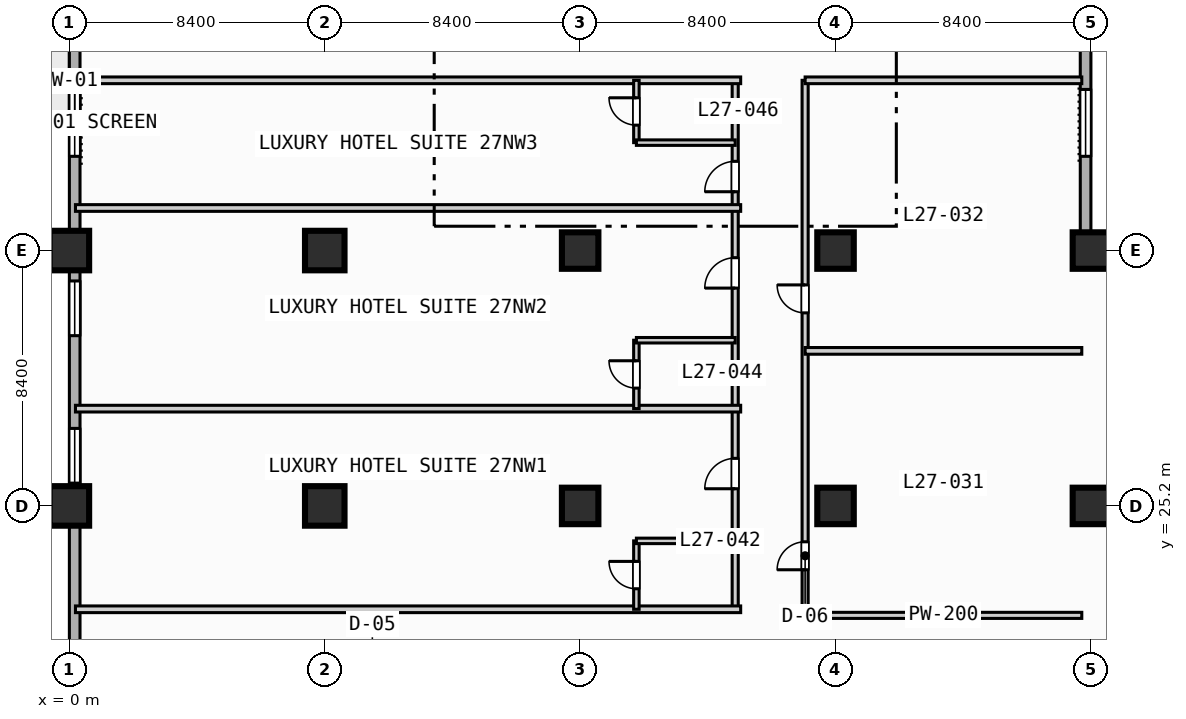
"""IFC4 building model, lengths in metres.
Left out: names, types, materials, properties, quantities, classifications, styles, units other than length and angle.
Written with IfcOpenShell. Run it as: python <this file> out.ifc"""

import sys

from ifc_helpers import new_model, si_unit, direction, frame, frame_2d, origin, origin_2d, place, context, subcontext, project, spatial, rectangle, extrude, element, fill, save


model = new_model("IFC4")
c1 = context("Model", 3, precision=1e-05, world=origin(), true_north=direction((0.0, 1.0)))
c2 = subcontext(c1, "Body", "Model", "MODEL_VIEW")
j1 = project(units=[si_unit("LENGTHUNIT", "METRE"), si_unit("PLANEANGLEUNIT", "RADIAN")], contexts=[c1])
p1 = place(None, origin())
s1 = spatial("IfcSite", under=j1, at=p1, CompositionType="ELEMENT")
p2 = place(p1, origin())
s2 = spatial("IfcBuilding", under=s1, at=p2, CompositionType="ELEMENT")
p3 = place(p2, frame((0.0, 0.0, 115.2)))
s3 = spatial("IfcBuildingStorey", under=s2, at=p3, CompositionType="ELEMENT", Elevation=115.2)
for number, where, z_axis, x_axis in (
    (1, (0.0, 25.2, 0.0), (0.0, 0.0, 1.0), (1.0, 0.0, 0.0)),
    (2, (0.0, 33.6, 0.0), (0.0, 0.0, 1.0), (1.0, 0.0, 0.0)),
    (3, (8.4, 25.2, 0.0), (0.0, 0.0, 1.0), (1.0, 0.0, 0.0)),
    (4, (8.4, 33.6, 0.0), (0.0, 0.0, 1.0), (1.0, 0.0, 0.0)),
):
    element("IfcColumn", number, at=place(p3, frame(where, z_axis=z_axis, x_axis=x_axis)), inside=s3, PredefinedType="COLUMN", context=c2, shape_type="SweptSolid", body=[
        extrude(rectangle(XDim=1.3, YDim=1.3, at=origin_2d()), origin(), (0.0, 0.0, 1.0), 3.8),
    ])
for number, where, z_axis, x_axis in (
    (5, (16.8, 25.2, 0.0), (0.0, 0.0, 1.0), (1.0, 0.0, 0.0)),
    (6, (16.8, 33.6, 0.0), (0.0, 0.0, 1.0), (1.0, 0.0, 0.0)),
    (7, (25.2, 25.2, 0.0), (0.0, 0.0, 1.0), (1.0, 0.0, 0.0)),
    (8, (25.2, 33.6, 0.0), (0.0, 0.0, 1.0), (1.0, 0.0, 0.0)),
    (9, (33.6, 25.2, 0.0), (0.0, 0.0, 1.0), (1.0, 0.0, 0.0)),
    (10, (33.6, 33.6, 0.0), (0.0, 0.0, 1.0), (1.0, 0.0, 0.0)),
):
    element("IfcColumn", number, at=place(p3, frame(where, z_axis=z_axis, x_axis=x_axis)), inside=s3, PredefinedType="COLUMN", context=c2, shape_type="SweptSolid", body=[
        extrude(rectangle(XDim=1.2, YDim=1.2, at=origin_2d()), origin(), (0.0, 0.0, 1.0), 3.8),
    ])
p4 = place(p3, frame((0.175, 3.175, 0.0), z_axis=(0.0, 0.0, 1.0), x_axis=(0.0, 1.0, 0.0)))
e11 = element("IfcWall", 11, at=p4, inside=s3, PredefinedType="STANDARD", context=c2, shape_type="SweptSolid", body=[
    extrude(rectangle(XDim=86.05, YDim=0.35, at=frame_2d((43.025, 0.0))), origin(), (0.0, 0.0, 1.0), 3.55),
])
p5 = place(p4, frame((42.325, 0.0, 0.0)))
e12 = element("IfcOpeningElement", 12, at=p5, cuts=e11, PredefinedType="OPENING", context=c2, shape_type="SweptSolid", body=[
    extrude(rectangle(XDim=1.4, YDim=2.2, at=frame_2d((0.7, 1.1))), frame((0.0, 0.185, 0.0), z_axis=(0.0, -1.0, 0.0), x_axis=(1.0, 0.0, 0.0)), (0.0, 0.0, 1.0), 0.37),
])
p6 = place(p4, frame((33.525, 0.0, 0.85)))
e13 = element("IfcOpeningElement", 13, at=p6, cuts=e11, PredefinedType="OPENING", context=c2, shape_type="SweptSolid", body=[
    extrude(rectangle(XDim=2.2, YDim=1.8, at=frame_2d((1.1, 0.9))), frame((0.0, 0.185, 0.0), z_axis=(0.0, -1.0, 0.0), x_axis=(1.0, 0.0, 0.0)), (0.0, 0.0, 1.0), 0.37),
])
p7 = place(p4, frame((22.775, 0.0, 0.85)))
e14 = element("IfcOpeningElement", 14, at=p7, cuts=e11, PredefinedType="OPENING", context=c2, shape_type="SweptSolid", body=[
    extrude(rectangle(XDim=1.8, YDim=1.8, at=frame_2d((0.9, 0.9))), frame((0.0, 0.185, 0.0), z_axis=(0.0, -1.0, 0.0), x_axis=(1.0, 0.0, 0.0)), (0.0, 0.0, 1.0), 0.37),
])
p8 = place(p4, frame((27.625, 0.0, 0.85)))
e15 = element("IfcOpeningElement", 15, at=p8, cuts=e11, PredefinedType="OPENING", context=c2, shape_type="SweptSolid", body=[
    extrude(rectangle(XDim=1.8, YDim=1.8, at=frame_2d((0.9, 0.9))), frame((0.0, 0.185, 0.0), z_axis=(0.0, -1.0, 0.0), x_axis=(1.0, 0.0, 0.0)), (0.0, 0.0, 1.0), 0.37),
])
p9 = place(p3, frame((33.425, 89.225, 0.0), z_axis=(0.0, 0.0, 1.0), x_axis=(0.0, -1.0, 0.0)))
e16 = element("IfcWall", 16, at=p9, inside=s3, PredefinedType="STANDARD", context=c2, shape_type="SweptSolid", body=[
    extrude(rectangle(XDim=55.8, YDim=0.35, at=frame_2d((27.9, 0.0))), origin(), (0.0, 0.0, 1.0), 3.55),
])
p10 = place(p9, frame((50.325, 0.0, 0.85)))
e17 = element("IfcOpeningElement", 17, at=p10, cuts=e16, PredefinedType="OPENING", context=c2, shape_type="SweptSolid", body=[
    extrude(rectangle(XDim=2.2, YDim=1.8, at=frame_2d((1.1, 0.9))), frame((0.0, 0.185, 0.0), z_axis=(0.0, -1.0, 0.0), x_axis=(1.0, 0.0, 0.0)), (0.0, 0.0, 1.0), 0.37),
])
p11 = place(p9, frame((33.525, 0.0, 0.85)))
e18 = element("IfcOpeningElement", 18, at=p11, cuts=e16, PredefinedType="OPENING", context=c2, shape_type="SweptSolid", body=[
    extrude(rectangle(XDim=2.2, YDim=1.8, at=frame_2d((1.1, 0.9))), frame((0.0, 0.185, 0.0), z_axis=(0.0, -1.0, 0.0), x_axis=(1.0, 0.0, 0.0)), (0.0, 0.0, 1.0), 0.37),
])
p12 = place(p9, frame((25.125, 0.0, 0.85)))
e19 = element("IfcOpeningElement", 19, at=p12, cuts=e16, PredefinedType="OPENING", context=c2, shape_type="SweptSolid", body=[
    extrude(rectangle(XDim=2.2, YDim=1.8, at=frame_2d((1.1, 0.9))), frame((0.0, 0.185, 0.0), z_axis=(0.0, -1.0, 0.0), x_axis=(1.0, 0.0, 0.0)), (0.0, 0.0, 1.0), 0.37),
])
p13 = place(p9, frame((16.725, 0.0, 0.85)))
e20 = element("IfcOpeningElement", 20, at=p13, cuts=e16, PredefinedType="OPENING", context=c2, shape_type="SweptSolid", body=[
    extrude(rectangle(XDim=2.2, YDim=1.8, at=frame_2d((1.1, 0.9))), frame((0.0, 0.185, 0.0), z_axis=(0.0, -1.0, 0.0), x_axis=(1.0, 0.0, 0.0)), (0.0, 0.0, 1.0), 0.37),
])
p14 = place(p9, frame((8.325, 0.0, 0.85)))
e21 = element("IfcOpeningElement", 21, at=p14, cuts=e16, PredefinedType="OPENING", context=c2, shape_type="SweptSolid", body=[
    extrude(rectangle(XDim=2.2, YDim=1.8, at=frame_2d((1.1, 0.9))), frame((0.0, 0.185, 0.0), z_axis=(0.0, -1.0, 0.0), x_axis=(1.0, 0.0, 0.0)), (0.0, 0.0, 1.0), 0.37),
])
p15 = place(p3, frame((33.425, 33.425, 0.0), z_axis=(0.0, 0.0, 1.0), x_axis=(1.0, 0.0, 0.0)))
e22 = element("IfcWall", 22, at=p15, inside=s3, PredefinedType="STANDARD", context=c2, shape_type="SweptSolid", body=[
    extrude(rectangle(XDim=39.0, YDim=0.35, at=frame_2d((19.5, 0.0))), origin(), (0.0, 0.0, 1.0), 3.55),
])
p16 = place(p15, frame((12.075, 0.0, 0.0)))
e23 = element("IfcOpeningElement", 23, at=p16, cuts=e22, PredefinedType="OPENING", context=c2, shape_type="SweptSolid", body=[
    extrude(rectangle(XDim=1.4, YDim=2.2, at=frame_2d((0.7, 1.1))), frame((0.0, 0.185, 0.0), z_axis=(0.0, -1.0, 0.0), x_axis=(1.0, 0.0, 0.0)), (0.0, 0.0, 1.0), 0.37),
])
p17 = place(p15, frame((20.075, 0.0, 0.85)))
e24 = element("IfcOpeningElement", 24, at=p17, cuts=e22, PredefinedType="OPENING", context=c2, shape_type="SweptSolid", body=[
    extrude(rectangle(XDim=2.2, YDim=1.8, at=frame_2d((1.1, 0.9))), frame((0.0, 0.185, 0.0), z_axis=(0.0, -1.0, 0.0), x_axis=(1.0, 0.0, 0.0)), (0.0, 0.0, 1.0), 0.37),
])
p18 = place(p15, frame((28.475, 0.0, 0.85)))
e25 = element("IfcOpeningElement", 25, at=p18, cuts=e22, PredefinedType="OPENING", context=c2, shape_type="SweptSolid", body=[
    extrude(rectangle(XDim=2.2, YDim=1.8, at=frame_2d((1.1, 0.9))), frame((0.0, 0.185, 0.0), z_axis=(0.0, -1.0, 0.0), x_axis=(1.0, 0.0, 0.0)), (0.0, 0.0, 1.0), 0.37),
])
p19 = place(p3, frame((24.2, 21.6, 0.0), z_axis=(0.0, 0.0, 1.0), x_axis=(0.0, 1.0, 0.0)))
e26 = element("IfcWall", 26, at=p19, inside=s3, PredefinedType="PARTITIONING", context=c2, shape_type="SweptSolid", body=[
    extrude(rectangle(XDim=17.6, YDim=0.2, at=frame_2d((8.8, 0.0))), origin(), (0.0, 0.0, 1.0), 3.55),
])
p20 = place(p19, frame((1.5, 0.0, 0.0)))
e27 = element("IfcOpeningElement", 27, at=p20, cuts=e26, PredefinedType="OPENING", context=c2, shape_type="SweptSolid", body=[
    extrude(rectangle(XDim=0.92, YDim=2.1, at=frame_2d((0.46, 1.05))), frame((0.0, 0.11, 0.0), z_axis=(0.0, -1.0, 0.0), x_axis=(1.0, 0.0, 0.0)), (0.0, 0.0, 1.0), 0.22),
])
p21 = place(p19, frame((9.95, 0.0, 0.0)))
e28 = element("IfcOpeningElement", 28, at=p21, cuts=e26, PredefinedType="OPENING", context=c2, shape_type="SweptSolid", body=[
    extrude(rectangle(XDim=0.92, YDim=2.1, at=frame_2d((0.46, 1.05))), frame((0.0, 0.11, 0.0), z_axis=(0.0, -1.0, 0.0), x_axis=(1.0, 0.0, 0.0)), (0.0, 0.0, 1.0), 0.22),
])
p22 = place(p3, frame((24.2, 21.6, 0.0), z_axis=(0.0, 0.0, 1.0), x_axis=(1.0, 0.0, 0.0)))
e29 = element("IfcWall", 29, at=p22, inside=s3, PredefinedType="PARTITIONING", context=c2, shape_type="SweptSolid", body=[
    extrude(rectangle(XDim=9.1, YDim=0.2, at=frame_2d((4.55, 0.0))), origin(), (0.0, 0.0, 1.0), 3.55),
])
for number, where, z_axis, x_axis in (
    (30, (24.2, 30.3, 0.0), (0.0, 0.0, 1.0), (1.0, 0.0, 0.0)),
    (31, (24.2, 39.2, 0.0), (0.0, 0.0, 1.0), (1.0, 0.0, 0.0)),
):
    element("IfcWall", number, at=place(p3, frame(where, z_axis=z_axis, x_axis=x_axis)), inside=s3, PredefinedType="PARTITIONING", context=c2, shape_type="SweptSolid", body=[
        extrude(rectangle(XDim=9.1, YDim=0.22, at=frame_2d((4.55, 0.0))), origin(), (0.0, 0.0, 1.0), 3.55),
    ])
p23 = place(p3, frame((21.9, 21.8, 0.0), z_axis=(0.0, 0.0, 1.0), x_axis=(0.0, 1.0, 0.0)))
e32 = element("IfcWall", 32, at=p23, inside=s3, PredefinedType="PARTITIONING", context=c2, shape_type="SweptSolid", body=[
    extrude(rectangle(XDim=17.4, YDim=0.2, at=frame_2d((8.7, 0.0))), origin(), (0.0, 0.0, 1.0), 3.55),
])
p24 = place(p23, frame((3.965, 0.0, 0.0)))
e33 = element("IfcOpeningElement", 33, at=p24, cuts=e32, PredefinedType="OPENING", context=c2, shape_type="SweptSolid", body=[
    extrude(rectangle(XDim=1.0, YDim=2.15, at=frame_2d((0.5, 1.075))), frame((0.0, 0.11, 0.0), z_axis=(0.0, -1.0, 0.0), x_axis=(1.0, 0.0, 0.0)), (0.0, 0.0, 1.0), 0.22),
])
p25 = place(p23, frame((10.565, 0.0, 0.0)))
e34 = element("IfcOpeningElement", 34, at=p25, cuts=e32, PredefinedType="OPENING", context=c2, shape_type="SweptSolid", body=[
    extrude(rectangle(XDim=1.0, YDim=2.15, at=frame_2d((0.5, 1.075))), frame((0.0, 0.11, 0.0), z_axis=(0.0, -1.0, 0.0), x_axis=(1.0, 0.0, 0.0)), (0.0, 0.0, 1.0), 0.22),
])
p26 = place(p23, frame((13.735, 0.0, 0.0)))
e35 = element("IfcOpeningElement", 35, at=p26, cuts=e32, PredefinedType="OPENING", context=c2, shape_type="SweptSolid", body=[
    extrude(rectangle(XDim=1.0, YDim=2.15, at=frame_2d((0.5, 1.075))), frame((0.0, 0.11, 0.0), z_axis=(0.0, -1.0, 0.0), x_axis=(1.0, 0.0, 0.0)), (0.0, 0.0, 1.0), 0.22),
])
p27 = place(p3, frame((0.2, 21.8, 0.0), z_axis=(0.0, 0.0, 1.0), x_axis=(1.0, 0.0, 0.0)))
e36 = element("IfcWall", 36, at=p27, inside=s3, PredefinedType="PARTITIONING", context=c2, shape_type="SweptSolid", body=[
    extrude(rectangle(XDim=21.88, YDim=0.22, at=frame_2d((10.94, 0.0))), origin(), (0.0, 0.0, 1.0), 3.55),
])
p28 = place(p3, frame((18.65, 21.8, 0.0), z_axis=(0.0, 0.0, 1.0), x_axis=(0.0, 1.0, 0.0)))
e37 = element("IfcWall", 37, at=p28, inside=s3, PredefinedType="PLUMBINGWALL", context=c2, shape_type="SweptSolid", body=[
    extrude(rectangle(XDim=2.25, YDim=0.18, at=frame_2d((1.125, 0.0))), origin(), (0.0, 0.0, 1.0), 3.55),
])
p29 = place(p28, frame((0.675, 0.0, 0.0)))
e38 = element("IfcOpeningElement", 38, at=p29, cuts=e37, PredefinedType="OPENING", context=c2, shape_type="SweptSolid", body=[
    extrude(rectangle(XDim=0.9, YDim=2.1, at=frame_2d((0.45, 1.05))), frame((0.0, 0.1, 0.0), z_axis=(0.0, -1.0, 0.0), x_axis=(1.0, 0.0, 0.0)), (0.0, 0.0, 1.0), 0.2),
])
p30 = place(p3, frame((18.65, 24.05, 0.0), z_axis=(0.0, 0.0, 1.0), x_axis=(1.0, 0.0, 0.0)))
e39 = element("IfcWall", 39, at=p30, inside=s3, PredefinedType="PLUMBINGWALL", context=c2, shape_type="SweptSolid", body=[
    extrude(rectangle(XDim=3.25, YDim=0.18, at=frame_2d((1.625, 0.0))), origin(), (0.0, 0.0, 1.0), 3.55),
])
p31 = place(p3, frame((0.2, 28.4, 0.0), z_axis=(0.0, 0.0, 1.0), x_axis=(1.0, 0.0, 0.0)))
e40 = element("IfcWall", 40, at=p31, inside=s3, PredefinedType="PARTITIONING", context=c2, shape_type="SweptSolid", body=[
    extrude(rectangle(XDim=21.88, YDim=0.22, at=frame_2d((10.94, 0.0))), origin(), (0.0, 0.0, 1.0), 3.55),
])
p32 = place(p3, frame((18.65, 28.4, 0.0), z_axis=(0.0, 0.0, 1.0), x_axis=(0.0, 1.0, 0.0)))
e41 = element("IfcWall", 41, at=p32, inside=s3, PredefinedType="PLUMBINGWALL", context=c2, shape_type="SweptSolid", body=[
    extrude(rectangle(XDim=2.25, YDim=0.18, at=frame_2d((1.125, 0.0))), origin(), (0.0, 0.0, 1.0), 3.55),
])
p33 = place(p32, frame((0.675, 0.0, 0.0)))
e42 = element("IfcOpeningElement", 42, at=p33, cuts=e41, PredefinedType="OPENING", context=c2, shape_type="SweptSolid", body=[
    extrude(rectangle(XDim=0.9, YDim=2.1, at=frame_2d((0.45, 1.05))), frame((0.0, 0.1, 0.0), z_axis=(0.0, -1.0, 0.0), x_axis=(1.0, 0.0, 0.0)), (0.0, 0.0, 1.0), 0.2),
])
p34 = place(p3, frame((18.65, 30.65, 0.0), z_axis=(0.0, 0.0, 1.0), x_axis=(1.0, 0.0, 0.0)))
e43 = element("IfcWall", 43, at=p34, inside=s3, PredefinedType="PLUMBINGWALL", context=c2, shape_type="SweptSolid", body=[
    extrude(rectangle(XDim=3.25, YDim=0.18, at=frame_2d((1.625, 0.0))), origin(), (0.0, 0.0, 1.0), 3.55),
])
for number, where, z_axis, x_axis in (
    (44, (0.2, 35.0, 0.0), (0.0, 0.0, 1.0), (1.0, 0.0, 0.0)),
    (45, (0.2, 39.2, 0.0), (0.0, 0.0, 1.0), (1.0, 0.0, 0.0)),
):
    element("IfcWall", number, at=place(p3, frame(where, z_axis=z_axis, x_axis=x_axis)), inside=s3, PredefinedType="PARTITIONING", context=c2, shape_type="SweptSolid", body=[
        extrude(rectangle(XDim=21.88, YDim=0.22, at=frame_2d((10.94, 0.0))), origin(), (0.0, 0.0, 1.0), 3.55),
    ])
p35 = place(p3, frame((18.65, 37.15, 0.0), z_axis=(0.0, 0.0, 1.0), x_axis=(0.0, 1.0, 0.0)))
e46 = element("IfcWall", 46, at=p35, inside=s3, PredefinedType="PLUMBINGWALL", context=c2, shape_type="SweptSolid", body=[
    extrude(rectangle(XDim=2.05, YDim=0.18, at=frame_2d((1.025, 0.0))), origin(), (0.0, 0.0, 1.0), 3.55),
])
p36 = place(p35, frame((0.575, 0.0, 0.0)))
e47 = element("IfcOpeningElement", 47, at=p36, cuts=e46, PredefinedType="OPENING", context=c2, shape_type="SweptSolid", body=[
    extrude(rectangle(XDim=0.9, YDim=2.1, at=frame_2d((0.45, 1.05))), frame((0.0, 0.1, 0.0), z_axis=(0.0, -1.0, 0.0), x_axis=(1.0, 0.0, 0.0)), (0.0, 0.0, 1.0), 0.2),
])
p37 = place(p3, frame((18.65, 37.15, 0.0), z_axis=(0.0, 0.0, 1.0), x_axis=(1.0, 0.0, 0.0)))
e48 = element("IfcWall", 48, at=p37, inside=s3, PredefinedType="PLUMBINGWALL", context=c2, shape_type="SweptSolid", body=[
    extrude(rectangle(XDim=3.25, YDim=0.18, at=frame_2d((1.625, 0.0))), origin(), (0.0, 0.0, 1.0), 3.55),
])
p38 = place(p6, origin())
e49 = element("IfcWindow", 49, at=p38, inside=s3, PartitioningType="SINGLE_PANEL", PredefinedType="WINDOW", context=c2, shape_type="SweptSolid", body=[
    extrude(rectangle(XDim=2.2, YDim=1.8, at=frame_2d((1.1, 0.9))), frame((0.0, 0.03, 0.0), z_axis=(0.0, -1.0, 0.0), x_axis=(1.0, 0.0, 0.0)), (0.0, 0.0, 1.0), 0.06),
])
fill(e13, e49)
p39 = place(p7, origin())
e50 = element("IfcWindow", 50, at=p39, inside=s3, PartitioningType="SINGLE_PANEL", PredefinedType="WINDOW", context=c2, shape_type="SweptSolid", body=[
    extrude(rectangle(XDim=1.8, YDim=1.8, at=frame_2d((0.9, 0.9))), frame((0.0, 0.03, 0.0), z_axis=(0.0, -1.0, 0.0), x_axis=(1.0, 0.0, 0.0)), (0.0, 0.0, 1.0), 0.06),
])
fill(e14, e50)
p40 = place(p8, origin())
e51 = element("IfcWindow", 51, at=p40, inside=s3, PartitioningType="SINGLE_PANEL", PredefinedType="WINDOW", context=c2, shape_type="SweptSolid", body=[
    extrude(rectangle(XDim=1.8, YDim=1.8, at=frame_2d((0.9, 0.9))), frame((0.0, 0.03, 0.0), z_axis=(0.0, -1.0, 0.0), x_axis=(1.0, 0.0, 0.0)), (0.0, 0.0, 1.0), 0.06),
])
fill(e15, e51)
p41 = place(p10, origin())
e52 = element("IfcWindow", 52, at=p41, inside=s3, PartitioningType="SINGLE_PANEL", PredefinedType="WINDOW", context=c2, shape_type="SweptSolid", body=[
    extrude(rectangle(XDim=2.2, YDim=1.8, at=frame_2d((1.1, 0.9))), frame((0.0, 0.03, 0.0), z_axis=(0.0, -1.0, 0.0), x_axis=(1.0, 0.0, 0.0)), (0.0, 0.0, 1.0), 0.06),
])
fill(e17, e52)
p42 = place(p20, origin())
e53 = element("IfcDoor", 53, at=p42, inside=s3, OperationType="SINGLE_SWING_LEFT", PredefinedType="DOOR", context=c2, shape_type="SweptSolid", body=[
    extrude(rectangle(XDim=0.92, YDim=2.1, at=frame_2d((0.46, 1.05))), frame((0.0, 0.025, 0.0), z_axis=(0.0, -1.0, 0.0), x_axis=(1.0, 0.0, 0.0)), (0.0, 0.0, 1.0), 0.05),
])
fill(e27, e53)
p43 = place(p21, origin())
e54 = element("IfcDoor", 54, at=p43, inside=s3, OperationType="SINGLE_SWING_RIGHT", PredefinedType="DOOR", context=c2, shape_type="SweptSolid", body=[
    extrude(rectangle(XDim=0.92, YDim=2.1, at=frame_2d((0.46, 1.05))), frame((0.0, 0.025, 0.0), z_axis=(0.0, -1.0, 0.0), x_axis=(1.0, 0.0, 0.0)), (0.0, 0.0, 1.0), 0.05),
])
fill(e28, e54)
p44 = place(p24, origin())
e55 = element("IfcDoor", 55, at=p44, inside=s3, OperationType="SINGLE_SWING_LEFT", PredefinedType="DOOR", context=c2, shape_type="SweptSolid", body=[
    extrude(rectangle(XDim=1.0, YDim=2.15, at=frame_2d((0.5, 1.075))), frame((0.0, 0.025, 0.0), z_axis=(0.0, -1.0, 0.0), x_axis=(1.0, 0.0, 0.0)), (0.0, 0.0, 1.0), 0.05),
])
fill(e33, e55)
p45 = place(p25, origin())
e56 = element("IfcDoor", 56, at=p45, inside=s3, OperationType="SINGLE_SWING_LEFT", PredefinedType="DOOR", context=c2, shape_type="SweptSolid", body=[
    extrude(rectangle(XDim=1.0, YDim=2.15, at=frame_2d((0.5, 1.075))), frame((0.0, 0.025, 0.0), z_axis=(0.0, -1.0, 0.0), x_axis=(1.0, 0.0, 0.0)), (0.0, 0.0, 1.0), 0.05),
])
fill(e34, e56)
p46 = place(p26, origin())
e57 = element("IfcDoor", 57, at=p46, inside=s3, OperationType="SINGLE_SWING_LEFT", PredefinedType="DOOR", context=c2, shape_type="SweptSolid", body=[
    extrude(rectangle(XDim=1.0, YDim=2.15, at=frame_2d((0.5, 1.075))), frame((0.0, 0.025, 0.0), z_axis=(0.0, -1.0, 0.0), x_axis=(1.0, 0.0, 0.0)), (0.0, 0.0, 1.0), 0.05),
])
fill(e35, e57)
p47 = place(p29, origin())
e58 = element("IfcDoor", 58, at=p47, inside=s3, OperationType="SINGLE_SWING_RIGHT", PredefinedType="DOOR", context=c2, shape_type="SweptSolid", body=[
    extrude(rectangle(XDim=0.9, YDim=2.1, at=frame_2d((0.45, 1.05))), frame((0.0, 0.025, 0.0), z_axis=(0.0, -1.0, 0.0), x_axis=(1.0, 0.0, 0.0)), (0.0, 0.0, 1.0), 0.05),
])
fill(e38, e58)
p48 = place(p33, origin())
e59 = element("IfcDoor", 59, at=p48, inside=s3, OperationType="SINGLE_SWING_RIGHT", PredefinedType="DOOR", context=c2, shape_type="SweptSolid", body=[
    extrude(rectangle(XDim=0.9, YDim=2.1, at=frame_2d((0.45, 1.05))), frame((0.0, 0.025, 0.0), z_axis=(0.0, -1.0, 0.0), x_axis=(1.0, 0.0, 0.0)), (0.0, 0.0, 1.0), 0.05),
])
fill(e42, e59)
p49 = place(p36, origin())
e60 = element("IfcDoor", 60, at=p49, inside=s3, OperationType="SINGLE_SWING_RIGHT", PredefinedType="DOOR", context=c2, shape_type="SweptSolid", body=[
    extrude(rectangle(XDim=0.9, YDim=2.1, at=frame_2d((0.45, 1.05))), frame((0.0, 0.025, 0.0), z_axis=(0.0, -1.0, 0.0), x_axis=(1.0, 0.0, 0.0)), (0.0, 0.0, 1.0), 0.05),
])
fill(e47, e60)
save(model, sys.argv[1])
